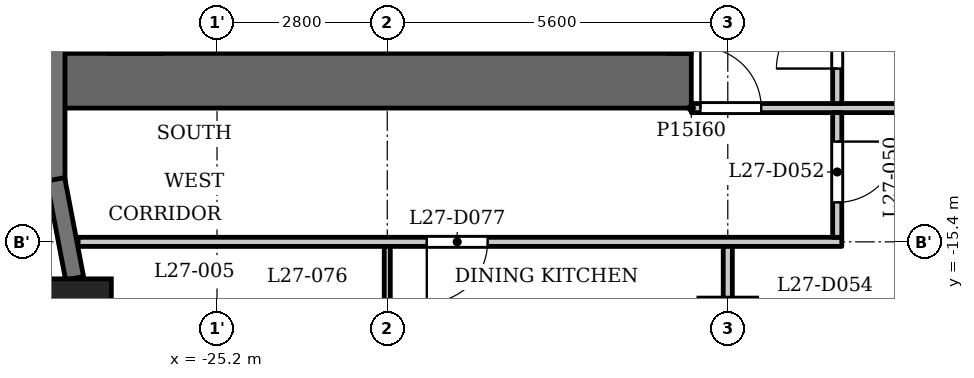
"""IFC4 building model, lengths in metres.
Left out: names, types, materials, properties, quantities, classifications, styles, units other than length and angle.
Written with IfcOpenShell. Run it as: python <this file> out.ifc"""

import sys

from ifc_helpers import new_model, si_unit, direction, frame, frame_2d, origin, origin_2d, place, context, subcontext, project, spatial, rectangle, extrude, element, fill, save


model = new_model("IFC4")
c1 = context("Model", 3, precision=1e-05, world=origin(), true_north=direction((0.0, 1.0)))
c2 = subcontext(c1, "Body", "Model", "MODEL_VIEW")
j1 = project(units=[si_unit("LENGTHUNIT", "METRE"), si_unit("PLANEANGLEUNIT", "RADIAN")], contexts=[c1])
p1 = place(None, origin())
s1 = spatial("IfcSite", under=j1, at=p1, CompositionType="ELEMENT")
p2 = place(p1, origin())
s2 = spatial("IfcBuilding", under=s1, at=p2, CompositionType="ELEMENT")
p3 = place(p2, frame((0.0, 0.0, 107.8)))
s3 = spatial("IfcBuildingStorey", under=s2, at=p3, CompositionType="ELEMENT", Elevation=107.8)
p4 = place(p3, frame((-27.538, -16.609, 0.0), z_axis=(0.0, 0.0, 1.0), x_axis=(1.0, 0.0, 0.0)))
e1 = element("IfcColumn", 1, at=p4, inside=s3, PredefinedType="COLUMN", context=c2, shape_type="SweptSolid", body=[
    extrude(rectangle(XDim=1.2, YDim=1.2, at=origin_2d()), origin(), (0.0, 0.0, 1.0), 3.5),
])
p5 = place(p3, frame((-16.8, -16.8, 0.0), z_axis=(0.0, 0.0, 1.0), x_axis=(1.0, 0.0, 0.0)))
e2 = element("IfcColumn", 2, at=p5, inside=s3, PredefinedType="COLUMN", context=c2, shape_type="SweptSolid", body=[
    extrude(rectangle(XDim=0.95, YDim=0.95, at=origin_2d()), origin(), (0.0, 0.0, 1.0), 3.5),
])
p6 = place(p3, frame((-27.85, -11.8, 0.0), z_axis=(0.0, 0.0, 1.0), x_axis=(0.0, -1.0, 0.0)))
e3 = element("IfcWall", 3, at=p6, inside=s3, PredefinedType="SOLIDWALL", context=c2, shape_type="SweptSolid", body=[
    extrude(rectangle(XDim=2.6, YDim=0.3, at=frame_2d((1.3, 0.0))), origin(), (0.0, 0.0, 1.0), 2.4),
])
p7 = place(p3, frame((-27.853, -14.372, 0.0), z_axis=(0.0, 0.0, 1.0), x_axis=(0.187349172861, -0.982293381546, 0.0)))
e4 = element("IfcWall", 4, at=p7, inside=s3, PredefinedType="SOLIDWALL", context=c2, shape_type="SweptSolid", body=[
    extrude(rectangle(XDim=1.656, YDim=0.3, at=frame_2d((0.828, 0.0))), origin(), (0.0, 0.0, 1.0), 2.4),
])
p8 = place(p3, frame((-17.4, -12.75, 0.0), z_axis=(0.0, 0.0, 1.0), x_axis=(-1.0, 0.0, 0.0)))
e5 = element("IfcWall", 5, at=p8, inside=s3, PredefinedType="SHEAR", context=c2, shape_type="SweptSolid", body=[
    extrude(rectangle(XDim=10.4, YDim=0.9, at=frame_2d((5.2, 0.0))), origin(), (0.0, 0.0, 1.0), 3.2),
])
p9 = place(p3, frame((-17.6, -12.3, 0.0), z_axis=(0.0, 0.0, 1.0), x_axis=(0.0, 1.0, 0.0)))
e6 = element("IfcWall", 6, at=p9, inside=s3, PredefinedType="SHEAR", context=c2, shape_type="SweptSolid", body=[
    extrude(rectangle(XDim=24.6, YDim=0.4, at=frame_2d((12.3, 0.0))), origin(), (0.0, 0.0, 1.0), 3.2),
])
p10 = place(p9, frame((6.0, 0.0, 0.0)))
e7 = element("IfcOpeningElement", 7, at=p10, cuts=e6, PredefinedType="OPENING", context=c2, shape_type="SweptSolid", body=[
    extrude(rectangle(XDim=1.1, YDim=2.1, at=frame_2d((0.55, 1.05))), frame((0.0, 0.21, 0.0), z_axis=(0.0, -1.0, 0.0), x_axis=(1.0, 0.0, 0.0)), (0.0, 0.0, 1.0), 0.42),
])
p11 = place(p9, frame((8.4, 0.0, 0.0)))
e8 = element("IfcOpeningElement", 8, at=p11, cuts=e6, PredefinedType="OPENING", context=c2, shape_type="SweptSolid", body=[
    extrude(rectangle(XDim=1.1, YDim=2.1, at=frame_2d((0.55, 1.05))), frame((0.0, 0.21, 0.0), z_axis=(0.0, -1.0, 0.0), x_axis=(1.0, 0.0, 0.0)), (0.0, 0.0, 1.0), 0.42),
])
p12 = place(p9, frame((10.8, 0.0, 0.0)))
e9 = element("IfcOpeningElement", 9, at=p12, cuts=e6, PredefinedType="OPENING", context=c2, shape_type="SweptSolid", body=[
    extrude(rectangle(XDim=1.1, YDim=2.1, at=frame_2d((0.55, 1.05))), frame((0.0, 0.21, 0.0), z_axis=(0.0, -1.0, 0.0), x_axis=(1.0, 0.0, 0.0)), (0.0, 0.0, 1.0), 0.42),
])
p13 = place(p9, frame((16.75, 0.0, 0.0)))
e10 = element("IfcOpeningElement", 10, at=p13, cuts=e6, PredefinedType="OPENING", context=c2, shape_type="SweptSolid", body=[
    extrude(rectangle(XDim=0.9, YDim=2.1, at=frame_2d((0.45, 1.05))), frame((0.0, 0.21, 0.0), z_axis=(0.0, -1.0, 0.0), x_axis=(1.0, 0.0, 0.0)), (0.0, 0.0, 1.0), 0.42),
])
p14 = place(p9, frame((22.8, 0.0, 0.0)))
e11 = element("IfcOpeningElement", 11, at=p14, cuts=e6, PredefinedType="OPENING", context=c2, shape_type="SweptSolid", body=[
    extrude(rectangle(XDim=1.1, YDim=2.1, at=frame_2d((0.55, 1.05))), frame((0.0, 0.21, 0.0), z_axis=(0.0, -1.0, 0.0), x_axis=(1.0, 0.0, 0.0)), (0.0, 0.0, 1.0), 0.42),
])
p15 = place(p9, frame((0.7, 0.0, 0.0)))
e12 = element("IfcOpeningElement", 12, at=p15, cuts=e6, PredefinedType="OPENING", context=c2, shape_type="SweptSolid", body=[
    extrude(rectangle(XDim=1.1, YDim=2.1, at=frame_2d((0.55, 1.05))), frame((0.0, 0.21, 0.0), z_axis=(0.0, -1.0, 0.0), x_axis=(1.0, 0.0, 0.0)), (0.0, 0.0, 1.0), 0.42),
])
p16 = place(p9, frame((12.775, 0.0, 0.0)))
e13 = element("IfcOpeningElement", 13, at=p16, cuts=e6, PredefinedType="OPENING", context=c2, shape_type="SweptSolid", body=[
    extrude(rectangle(XDim=1.8, YDim=2.1, at=frame_2d((0.9, 1.05))), frame((0.0, 0.21, 0.0), z_axis=(0.0, -1.0, 0.0), x_axis=(1.0, 0.0, 0.0)), (0.0, 0.0, 1.0), 0.42),
])
p17 = place(p3, frame((-26.55, -12.3, 0.0), z_axis=(0.0, 0.0, 1.0), x_axis=(0.0, 1.0, 0.0)))
e14 = element("IfcWall", 14, at=p17, inside=s3, PredefinedType="SHEAR", context=c2, shape_type="SweptSolid", body=[
    extrude(rectangle(XDim=24.6, YDim=0.9, at=frame_2d((12.3, 0.0))), origin(), (0.0, 0.0, 1.0), 3.2),
])
p18 = place(p3, frame((-23.55, -12.3, 0.0), z_axis=(0.0, 0.0, 1.0), x_axis=(0.0, 1.0, 0.0)))
e15 = element("IfcWall", 15, at=p18, inside=s3, PredefinedType="PARTITIONING", context=c2, shape_type="SweptSolid", body=[
    extrude(rectangle(XDim=2.5, YDim=0.2, at=frame_2d((1.25, 0.0))), origin(), (0.0, 0.0, 1.0), 3.2),
])
p19 = place(p18, frame((0.8, 0.0, 0.0)))
e16 = element("IfcOpeningElement", 16, at=p19, cuts=e15, PredefinedType="OPENING", context=c2, shape_type="SweptSolid", body=[
    extrude(rectangle(XDim=0.9, YDim=2.1, at=frame_2d((0.45, 1.05))), frame((0.0, 0.11, 0.0), z_axis=(0.0, -1.0, 0.0), x_axis=(1.0, 0.0, 0.0)), (0.0, 0.0, 1.0), 0.22),
])
p20 = place(p3, frame((-27.484, -15.4, 0.0), z_axis=(0.0, 0.0, 1.0), x_axis=(1.0, 0.0, 0.0)))
e17 = element("IfcWall", 17, at=p20, inside=s3, PredefinedType="PARTITIONING", context=c2, shape_type="SweptSolid", body=[
    extrude(rectangle(XDim=12.559, YDim=0.15, at=frame_2d((6.279, 0.0))), origin(), (0.0, 0.0, 1.0), 3.2),
])
p21 = place(p20, frame((5.734, 0.0, 0.0)))
e18 = element("IfcOpeningElement", 18, at=p21, cuts=e17, PredefinedType="OPENING", context=c2, shape_type="SweptSolid", body=[
    extrude(rectangle(XDim=1.0, YDim=2.1, at=frame_2d((0.5, 1.05))), frame((0.0, 0.085, 0.0), z_axis=(0.0, -1.0, 0.0), x_axis=(1.0, 0.0, 0.0)), (0.0, 0.0, 1.0), 0.17),
])
p22 = place(p3, frame((-17.4, -13.2, 0.0), z_axis=(0.0, 0.0, 1.0), x_axis=(1.0, 0.0, 0.0)))
e19 = element("IfcWall", 19, at=p22, inside=s3, PredefinedType="PARTITIONING", context=c2, shape_type="SweptSolid", body=[
    extrude(rectangle(XDim=34.8, YDim=0.15, at=frame_2d((17.4, 0.0))), origin(), (0.0, 0.0, 1.0), 3.2),
])
p23 = place(p22, frame((0.15, 0.0, 0.0)))
e20 = element("IfcOpeningElement", 20, at=p23, cuts=e19, PredefinedType="OPENING", context=c2, shape_type="SweptSolid", body=[
    extrude(rectangle(XDim=1.0, YDim=2.1, at=frame_2d((0.5, 1.05))), frame((0.0, 0.085, 0.0), z_axis=(0.0, -1.0, 0.0), x_axis=(1.0, 0.0, 0.0)), (0.0, 0.0, 1.0), 0.17),
])
p24 = place(p22, frame((33.55, 0.0, 0.0)))
e21 = element("IfcOpeningElement", 21, at=p24, cuts=e19, PredefinedType="OPENING", context=c2, shape_type="SweptSolid", body=[
    extrude(rectangle(XDim=1.0, YDim=2.1, at=frame_2d((0.5, 1.05))), frame((0.0, 0.085, 0.0), z_axis=(0.0, -1.0, 0.0), x_axis=(1.0, 0.0, 0.0)), (0.0, 0.0, 1.0), 0.17),
])
p25 = place(p22, frame((8.1, 0.0, 0.0)))
e22 = element("IfcOpeningElement", 22, at=p25, cuts=e19, PredefinedType="OPENING", context=c2, shape_type="SweptSolid", body=[
    extrude(rectangle(XDim=1.0, YDim=2.1, at=frame_2d((0.5, 1.05))), frame((0.0, 0.085, 0.0), z_axis=(0.0, -1.0, 0.0), x_axis=(1.0, 0.0, 0.0)), (0.0, 0.0, 1.0), 0.17),
])
p26 = place(p22, frame((12.45, 0.0, 0.0)))
e23 = element("IfcOpeningElement", 23, at=p26, cuts=e19, PredefinedType="OPENING", context=c2, shape_type="SweptSolid", body=[
    extrude(rectangle(XDim=1.0, YDim=2.1, at=frame_2d((0.5, 1.05))), frame((0.0, 0.085, 0.0), z_axis=(0.0, -1.0, 0.0), x_axis=(1.0, 0.0, 0.0)), (0.0, 0.0, 1.0), 0.17),
])
p27 = place(p22, frame((19.05, 0.0, 0.0)))
e24 = element("IfcOpeningElement", 24, at=p27, cuts=e19, PredefinedType="OPENING", context=c2, shape_type="SweptSolid", body=[
    extrude(rectangle(XDim=1.0, YDim=2.1, at=frame_2d((0.5, 1.05))), frame((0.0, 0.085, 0.0), z_axis=(0.0, -1.0, 0.0), x_axis=(1.0, 0.0, 0.0)), (0.0, 0.0, 1.0), 0.17),
])
p28 = place(p22, frame((24.9, 0.0, 0.0)))
e25 = element("IfcOpeningElement", 25, at=p28, cuts=e19, PredefinedType="OPENING", context=c2, shape_type="SweptSolid", body=[
    extrude(rectangle(XDim=1.0, YDim=2.1, at=frame_2d((0.5, 1.05))), frame((0.0, 0.085, 0.0), z_axis=(0.0, -1.0, 0.0), x_axis=(1.0, 0.0, 0.0)), (0.0, 0.0, 1.0), 0.17),
])
p29 = place(p3, frame((-22.4, -17.75, 0.0), z_axis=(0.0, 0.0, 1.0), x_axis=(0.0, 1.0, 0.0)))
e26 = element("IfcWall", 26, at=p29, inside=s3, PredefinedType="PARTITIONING", context=c2, shape_type="SweptSolid", body=[
    extrude(rectangle(XDim=2.275, YDim=0.1, at=frame_2d((1.137, 0.0))), origin(), (0.0, 0.0, 1.0), 3.2),
])
p30 = place(p3, frame((-16.8, -22.98, 0.0), z_axis=(0.0, 0.0, 1.0), x_axis=(0.0, 1.0, 0.0)))
e27 = element("IfcWall", 27, at=p30, inside=s3, PredefinedType="PARTITIONING", context=c2, shape_type="SweptSolid", body=[
    extrude(rectangle(XDim=7.505, YDim=0.15, at=frame_2d((3.752, 0.0))), origin(), (0.0, 0.0, 1.0), 3.2),
])
p31 = place(p3, frame((-15.0, -15.325, 0.0), z_axis=(0.0, 0.0, 1.0), x_axis=(0.0, 1.0, 0.0)))
e28 = element("IfcWall", 28, at=p31, inside=s3, PredefinedType="PARTITIONING", context=c2, shape_type="SweptSolid", body=[
    extrude(rectangle(XDim=2.05, YDim=0.15, at=frame_2d((1.025, 0.0))), origin(), (0.0, 0.0, 1.0), 3.2),
])
p32 = place(p31, frame((0.574, 0.0, 0.0)))
e29 = element("IfcOpeningElement", 29, at=p32, cuts=e28, PredefinedType="OPENING", context=c2, shape_type="SweptSolid", body=[
    extrude(rectangle(XDim=1.0, YDim=2.1, at=frame_2d((0.5, 1.05))), frame((0.0, 0.085, 0.0), z_axis=(0.0, -1.0, 0.0), x_axis=(1.0, 0.0, 0.0)), (0.0, 0.0, 1.0), 0.17),
])
p33 = place(p3, frame((-15.0, -13.125, 0.0), z_axis=(0.0, 0.0, 1.0), x_axis=(0.0, 1.0, 0.0)))
e30 = element("IfcWall", 30, at=p33, inside=s3, PredefinedType="PARTITIONING", context=c2, shape_type="SweptSolid", body=[
    extrude(rectangle(XDim=6.356, YDim=0.15, at=frame_2d((3.178, 0.0))), origin(), (0.0, 0.0, 1.0), 3.2),
])
p34 = place(p33, frame((0.575, 0.0, 0.0)))
e31 = element("IfcOpeningElement", 31, at=p34, cuts=e30, PredefinedType="OPENING", context=c2, shape_type="SweptSolid", body=[
    extrude(rectangle(XDim=1.0, YDim=2.1, at=frame_2d((0.5, 1.05))), frame((0.0, 0.085, 0.0), z_axis=(0.0, -1.0, 0.0), x_axis=(1.0, 0.0, 0.0)), (0.0, 0.0, 1.0), 0.17),
])
p35 = place(p34, origin())
e32 = element("IfcDoor", 32, at=p35, inside=s3, OperationType="SINGLE_SWING_RIGHT", PredefinedType="DOOR", context=c2, shape_type="SweptSolid", body=[
    extrude(rectangle(XDim=1.0, YDim=2.1, at=frame_2d((0.5, 1.05))), frame((0.0, 0.025, 0.0), z_axis=(0.0, -1.0, 0.0), x_axis=(1.0, 0.0, 0.0)), (0.0, 0.0, 1.0), 0.05),
])
fill(e31, e32)
p36 = place(p23, origin())
e33 = element("IfcDoor", 33, at=p36, inside=s3, OperationType="SINGLE_SWING_RIGHT", PredefinedType="DOOR", context=c2, shape_type="SweptSolid", body=[
    extrude(rectangle(XDim=1.0, YDim=2.1, at=frame_2d((0.5, 1.05))), frame((0.0, 0.025, 0.0), z_axis=(0.0, -1.0, 0.0), x_axis=(1.0, 0.0, 0.0)), (0.0, 0.0, 1.0), 0.05),
])
fill(e20, e33)
p37 = place(p32, origin())
e34 = element("IfcDoor", 34, at=p37, inside=s3, OperationType="SINGLE_SWING_RIGHT", PredefinedType="DOOR", context=c2, shape_type="SweptSolid", body=[
    extrude(rectangle(XDim=1.0, YDim=2.1, at=frame_2d((0.5, 1.05))), frame((0.0, 0.025, 0.0), z_axis=(0.0, -1.0, 0.0), x_axis=(1.0, 0.0, 0.0)), (0.0, 0.0, 1.0), 0.05),
])
fill(e29, e34)
p38 = place(p21, origin())
e35 = element("IfcDoor", 35, at=p38, inside=s3, OperationType="SINGLE_SWING_LEFT", PredefinedType="DOOR", context=c2, shape_type="SweptSolid", body=[
    extrude(rectangle(XDim=1.0, YDim=2.1, at=frame_2d((0.5, 1.05))), frame((0.0, 0.025, 0.0), z_axis=(0.0, -1.0, 0.0), x_axis=(1.0, 0.0, 0.0)), (0.0, 0.0, 1.0), 0.05),
])
fill(e18, e35)
save(model, sys.argv[1])
